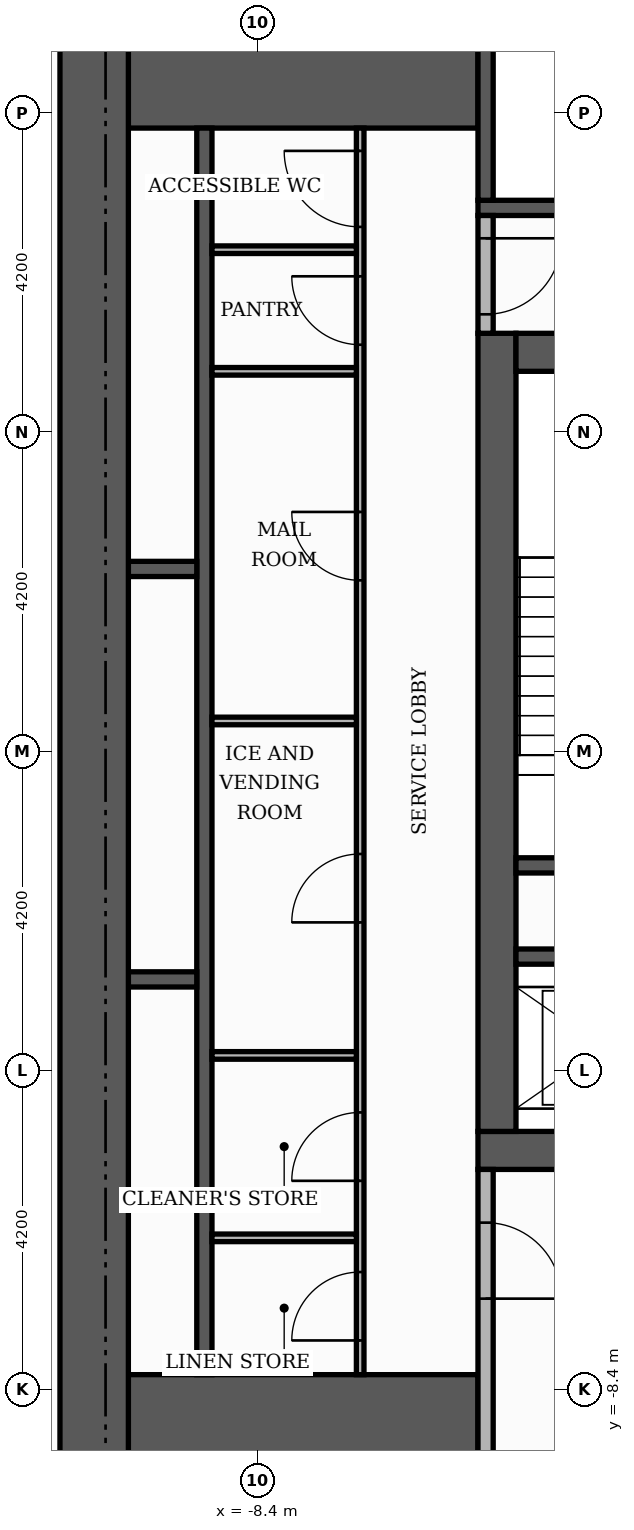
"""IFC4 building model, lengths in metres.
Left out: names, types, materials, properties, quantities, classifications, styles, units other than length and angle.
Written with IfcOpenShell. Run it as: python <this file> out.ifc"""

import sys

from ifc_helpers import new_model, si_unit, direction, frame, frame_2d, origin, place, context, subcontext, project, spatial, rectangle, extrude, element, fill, save


model = new_model("IFC4")
c1 = context("Model", 3, precision=1e-05, world=origin(), true_north=direction((0.0, 1.0)))
c2 = subcontext(c1, "Body", "Model", "MODEL_VIEW")
j1 = project(units=[si_unit("LENGTHUNIT", "METRE"), si_unit("PLANEANGLEUNIT", "RADIAN")], contexts=[c1])
p1 = place(None, origin())
s1 = spatial("IfcSite", under=j1, at=p1, CompositionType="ELEMENT")
p2 = place(p1, origin())
s2 = spatial("IfcBuilding", under=s1, at=p2, CompositionType="ELEMENT")
p3 = place(p2, frame((0.0, 0.0, 180.6)))
s3 = spatial("IfcBuildingStorey", under=s2, at=p3, CompositionType="ELEMENT", Elevation=180.6)
p4 = place(p3, frame((-5.5, -5.25, 0.0), z_axis=(0.0, 0.0, 1.0), x_axis=(1.0, 0.0, 0.0)))
e1 = element("IfcWall", 1, at=p4, inside=s3, PredefinedType="SHEAR", context=c2, shape_type="SweptSolid", body=[
    extrude(rectangle(XDim=11.0, YDim=0.5, at=frame_2d((5.5, 0.0))), origin(), (0.0, 0.0, 1.0), 7.38),
])
p5 = place(p4, frame((4.9, 0.0, 0.0)))
e2 = element("IfcOpeningElement", 2, at=p5, cuts=e1, PredefinedType="OPENING", context=c2, shape_type="SweptSolid", body=[
    extrude(rectangle(XDim=1.2, YDim=2.1, at=frame_2d((0.6, 1.05))), frame((0.0, 0.26, 0.0), z_axis=(0.0, -1.0, 0.0), x_axis=(1.0, 0.0, 0.0)), (0.0, 0.0, 1.0), 0.52),
])
p6 = place(p3, frame((-5.25, -5.0, 0.0), z_axis=(0.0, 0.0, 1.0), x_axis=(0.0, 1.0, 0.0)))
e3 = element("IfcWall", 3, at=p6, inside=s3, PredefinedType="SHEAR", context=c2, shape_type="SweptSolid", body=[
    extrude(rectangle(XDim=10.5, YDim=0.5, at=frame_2d((5.25, 0.0))), origin(), (0.0, 0.0, 1.0), 7.38),
])
p7 = place(p3, frame((-5.0, 5.25, 0.0), z_axis=(0.0, 0.0, 1.0), x_axis=(1.0, 0.0, 0.0)))
e4 = element("IfcWall", 4, at=p7, inside=s3, PredefinedType="SHEAR", context=c2, shape_type="SweptSolid", body=[
    extrude(rectangle(XDim=10.0, YDim=0.5, at=frame_2d((5.0, 0.0))), origin(), (0.0, 0.0, 1.0), 7.38),
])
p8 = place(p7, frame((4.4, 0.0, 0.0)))
e5 = element("IfcOpeningElement", 5, at=p8, cuts=e4, PredefinedType="OPENING", context=c2, shape_type="SweptSolid", body=[
    extrude(rectangle(XDim=1.2, YDim=2.1, at=frame_2d((0.6, 1.05))), frame((0.0, 0.26, 0.0), z_axis=(0.0, -1.0, 0.0), x_axis=(1.0, 0.0, 0.0)), (0.0, 0.0, 1.0), 0.52),
])
for number, where, z_axis, x_axis in (
    (6, (-10.1, -9.15, 0.0), (0.0, 0.0, 1.0), (1.0, 0.0, 0.0)),
    (7, (-10.1, 9.15, 0.0), (0.0, 0.0, 1.0), (1.0, 0.0, 0.0)),
):
    element("IfcWall", number, at=place(p3, frame(where, z_axis=z_axis, x_axis=x_axis)), inside=s3, PredefinedType="SHEAR", context=c2, shape_type="SweptSolid", body=[
        extrude(rectangle(XDim=4.6, YDim=1.9, at=frame_2d((2.3, 0.0))), origin(), (0.0, 0.0, 1.0), 7.38),
    ])
p9 = place(p3, frame((-5.0, -1.5, 0.0), z_axis=(0.0, 0.0, 1.0), x_axis=(1.0, 0.0, 0.0)))
e8 = element("IfcWall", 8, at=p9, inside=s3, PredefinedType="SHEAR", context=c2, shape_type="SweptSolid", body=[
    extrude(rectangle(XDim=3.05, YDim=0.2, at=frame_2d((1.525, 0.0))), origin(), (0.0, 0.0, 1.0), 7.38),
])
p10 = place(p3, frame((-5.5, 7.15, 0.0), z_axis=(0.0, 0.0, 1.0), x_axis=(1.0, 0.0, 0.0)))
e9 = element("IfcWall", 9, at=p10, inside=s3, PredefinedType="SHEAR", context=c2, shape_type="SweptSolid", body=[
    extrude(rectangle(XDim=6.8, YDim=0.2, at=frame_2d((3.4, 0.0))), origin(), (0.0, 0.0, 1.0), 7.38),
])
p11 = place(p3, frame((-5.4, 7.25, 0.0), z_axis=(0.0, 0.0, 1.0), x_axis=(0.0, 1.0, 0.0)))
e10 = element("IfcWall", 10, at=p11, inside=s3, PredefinedType="SHEAR", context=c2, shape_type="SweptSolid", body=[
    extrude(rectangle(XDim=2.85, YDim=0.2, at=frame_2d((1.425, 0.0))), origin(), (0.0, 0.0, 1.0), 7.38),
])
p12 = place(p3, frame((-9.1, -8.2, 0.0), z_axis=(0.0, 0.0, 1.0), x_axis=(0.0, 1.0, 0.0)))
e11 = element("IfcWall", 11, at=p12, inside=s3, PredefinedType="SHEAR", context=c2, shape_type="SweptSolid", body=[
    extrude(rectangle(XDim=16.4, YDim=0.2, at=frame_2d((8.2, 0.0))), origin(), (0.0, 0.0, 1.0), 7.38),
])
p13 = place(p3, frame((-10.1, -3.0, 0.0), z_axis=(0.0, 0.0, 1.0), x_axis=(1.0, 0.0, 0.0)))
e12 = element("IfcWall", 12, at=p13, inside=s3, PredefinedType="SHEAR", context=c2, shape_type="SweptSolid", body=[
    extrude(rectangle(XDim=0.9, YDim=0.2, at=frame_2d((0.45, 0.0))), origin(), (0.0, 0.0, 1.0), 7.38),
])
p14 = place(p3, frame((-5.0, -2.7, 0.0), z_axis=(0.0, 0.0, 1.0), x_axis=(1.0, 0.0, 0.0)))
e13 = element("IfcWall", 13, at=p14, inside=s3, PredefinedType="SHEAR", context=c2, shape_type="SweptSolid", body=[
    extrude(rectangle(XDim=2.85, YDim=0.2, at=frame_2d((1.425, 0.0))), origin(), (0.0, 0.0, 1.0), 7.38),
])
p15 = place(p3, frame((-10.1, 2.4, 0.0), z_axis=(0.0, 0.0, 1.0), x_axis=(1.0, 0.0, 0.0)))
e14 = element("IfcWall", 14, at=p15, inside=s3, PredefinedType="SHEAR", context=c2, shape_type="SweptSolid", body=[
    extrude(rectangle(XDim=0.9, YDim=0.2, at=frame_2d((0.45, 0.0))), origin(), (0.0, 0.0, 1.0), 7.38),
])
p16 = place(p3, frame((-10.55, -10.1, 0.0), z_axis=(0.0, 0.0, 1.0), x_axis=(0.0, 1.0, 0.0)))
e15 = element("IfcWall", 15, at=p16, inside=s3, PredefinedType="SHEAR", context=c2, shape_type="SweptSolid", body=[
    extrude(rectangle(XDim=20.2, YDim=0.9, at=frame_2d((10.1, 0.0))), origin(), (0.0, 0.0, 1.0), 7.38),
])
p17 = place(p3, frame((-5.4, -10.1, 0.0), z_axis=(0.0, 0.0, 1.0), x_axis=(0.0, 1.0, 0.0)))
e16 = element("IfcWall", 16, at=p17, inside=s3, PredefinedType="PARTITIONING", context=c2, shape_type="SweptSolid", body=[
    extrude(rectangle(XDim=4.6, YDim=0.2, at=frame_2d((2.3, 0.0))), origin(), (0.0, 0.0, 1.0), 7.38),
])
p18 = place(p17, frame((2.9, 0.0, 0.0)))
e17 = element("IfcOpeningElement", 17, at=p18, cuts=e16, PredefinedType="OPENING", context=c2, shape_type="SweptSolid", body=[
    extrude(rectangle(XDim=1.0, YDim=2.1, at=frame_2d((0.5, 1.05))), frame((0.0, 0.11, 0.0), z_axis=(0.0, -1.0, 0.0), x_axis=(1.0, 0.0, 0.0)), (0.0, 0.0, 1.0), 0.22),
])
p19 = place(p3, frame((-7.05, -8.2, 0.0), z_axis=(0.0, 0.0, 1.0), x_axis=(0.0, 1.0, 0.0)))
e18 = element("IfcWall", 18, at=p19, inside=s3, PredefinedType="PARTITIONING", context=c2, shape_type="SweptSolid", body=[
    extrude(rectangle(XDim=16.4, YDim=0.1, at=frame_2d((8.2, 0.0))), origin(), (0.0, 0.0, 1.0), 7.38),
])
p20 = place(p19, frame((0.45, 0.0, 0.0)))
e19 = element("IfcOpeningElement", 19, at=p20, cuts=e18, PredefinedType="OPENING", context=c2, shape_type="SweptSolid", body=[
    extrude(rectangle(XDim=0.9, YDim=2.1, at=frame_2d((0.45, 1.05))), frame((0.0, 0.06, 0.0), z_axis=(0.0, -1.0, 0.0), x_axis=(1.0, 0.0, 0.0)), (0.0, 0.0, 1.0), 0.12),
])
p21 = place(p19, frame((2.55, 0.0, 0.0)))
e20 = element("IfcOpeningElement", 20, at=p21, cuts=e18, PredefinedType="OPENING", context=c2, shape_type="SweptSolid", body=[
    extrude(rectangle(XDim=0.9, YDim=2.1, at=frame_2d((0.45, 1.05))), frame((0.0, 0.06, 0.0), z_axis=(0.0, -1.0, 0.0), x_axis=(1.0, 0.0, 0.0)), (0.0, 0.0, 1.0), 0.12),
])
p22 = place(p19, frame((5.95, 0.0, 0.0)))
e21 = element("IfcOpeningElement", 21, at=p22, cuts=e18, PredefinedType="OPENING", context=c2, shape_type="SweptSolid", body=[
    extrude(rectangle(XDim=0.9, YDim=2.1, at=frame_2d((0.45, 1.05))), frame((0.0, 0.06, 0.0), z_axis=(0.0, -1.0, 0.0), x_axis=(1.0, 0.0, 0.0)), (0.0, 0.0, 1.0), 0.12),
])
p23 = place(p19, frame((10.45, 0.0, 0.0)))
e22 = element("IfcOpeningElement", 22, at=p23, cuts=e18, PredefinedType="OPENING", context=c2, shape_type="SweptSolid", body=[
    extrude(rectangle(XDim=0.9, YDim=2.1, at=frame_2d((0.45, 1.05))), frame((0.0, 0.06, 0.0), z_axis=(0.0, -1.0, 0.0), x_axis=(1.0, 0.0, 0.0)), (0.0, 0.0, 1.0), 0.12),
])
p24 = place(p19, frame((13.55, 0.0, 0.0)))
e23 = element("IfcOpeningElement", 23, at=p24, cuts=e18, PredefinedType="OPENING", context=c2, shape_type="SweptSolid", body=[
    extrude(rectangle(XDim=0.9, YDim=2.1, at=frame_2d((0.45, 1.05))), frame((0.0, 0.06, 0.0), z_axis=(0.0, -1.0, 0.0), x_axis=(1.0, 0.0, 0.0)), (0.0, 0.0, 1.0), 0.12),
])
p25 = place(p19, frame((15.1, 0.0, 0.0)))
e24 = element("IfcOpeningElement", 24, at=p25, cuts=e18, PredefinedType="OPENING", context=c2, shape_type="SweptSolid", body=[
    extrude(rectangle(XDim=1.0, YDim=2.1, at=frame_2d((0.5, 1.05))), frame((0.0, 0.06, 0.0), z_axis=(0.0, -1.0, 0.0), x_axis=(1.0, 0.0, 0.0)), (0.0, 0.0, 1.0), 0.12),
])
for number, where, z_axis, x_axis in (
    (25, (-9.0, -6.4, 0.0), (0.0, 0.0, 1.0), (1.0, 0.0, 0.0)),
    (26, (-9.0, -4.0, 0.0), (0.0, 0.0, 1.0), (1.0, 0.0, 0.0)),
    (27, (-9.0, 0.4, 0.0), (0.0, 0.0, 1.0), (1.0, 0.0, 0.0)),
    (28, (-9.0, 5.0, 0.0), (0.0, 0.0, 1.0), (1.0, 0.0, 0.0)),
):
    element("IfcWall", number, at=place(p3, frame(where, z_axis=z_axis, x_axis=x_axis)), inside=s3, PredefinedType="PARTITIONING", context=c2, shape_type="SweptSolid", body=[
        extrude(rectangle(XDim=1.9, YDim=0.1, at=frame_2d((0.95, 0.0))), origin(), (0.0, 0.0, 1.0), 7.38),
    ])
p26 = place(p3, frame((-5.4, 5.5, 0.0), z_axis=(0.0, 0.0, 1.0), x_axis=(0.0, 1.0, 0.0)))
e29 = element("IfcWall", 29, at=p26, inside=s3, PredefinedType="PARTITIONING", context=c2, shape_type="SweptSolid", body=[
    extrude(rectangle(XDim=1.55, YDim=0.2, at=frame_2d((0.775, 0.0))), origin(), (0.0, 0.0, 1.0), 7.38),
])
p27 = place(p26, frame((0.25, 0.0, 0.0)))
e30 = element("IfcOpeningElement", 30, at=p27, cuts=e29, PredefinedType="OPENING", context=c2, shape_type="SweptSolid", body=[
    extrude(rectangle(XDim=1.0, YDim=2.1, at=frame_2d((0.5, 1.05))), frame((0.0, 0.11, 0.0), z_axis=(0.0, -1.0, 0.0), x_axis=(1.0, 0.0, 0.0)), (0.0, 0.0, 1.0), 0.22),
])
p28 = place(p3, frame((-9.0, 6.6, 0.0), z_axis=(0.0, 0.0, 1.0), x_axis=(1.0, 0.0, 0.0)))
e31 = element("IfcWall", 31, at=p28, inside=s3, PredefinedType="PARTITIONING", context=c2, shape_type="SweptSolid", body=[
    extrude(rectangle(XDim=1.9, YDim=0.1, at=frame_2d((0.95, 0.0))), origin(), (0.0, 0.0, 1.0), 7.38),
])
p29 = place(p27, frame((1.0, 0.0, 0.0), z_axis=(0.0, 0.0, 1.0), x_axis=(-1.0, 0.0, 0.0)))
e32 = element("IfcDoor", 32, at=p29, inside=s3, OperationType="SINGLE_SWING_RIGHT", PredefinedType="DOOR", context=c2, shape_type="SweptSolid", body=[
    extrude(rectangle(XDim=1.0, YDim=2.1, at=frame_2d((0.5, 1.05))), frame((0.0, 0.025, 0.0), z_axis=(0.0, -1.0, 0.0), x_axis=(1.0, 0.0, 0.0)), (0.0, 0.0, 1.0), 0.05),
])
fill(e30, e32)
p30 = place(p18, frame((1.0, 0.0, 0.0), z_axis=(0.0, 0.0, 1.0), x_axis=(-1.0, 0.0, 0.0)))
e33 = element("IfcDoor", 33, at=p30, inside=s3, OperationType="SINGLE_SWING_LEFT", PredefinedType="DOOR", context=c2, shape_type="SweptSolid", body=[
    extrude(rectangle(XDim=1.0, YDim=2.1, at=frame_2d((0.5, 1.05))), frame((0.0, 0.025, 0.0), z_axis=(0.0, -1.0, 0.0), x_axis=(1.0, 0.0, 0.0)), (0.0, 0.0, 1.0), 0.05),
])
fill(e17, e33)
p31 = place(p20, origin())
e34 = element("IfcDoor", 34, at=p31, inside=s3, OperationType="SINGLE_SWING_LEFT", PredefinedType="DOOR", context=c2, shape_type="SweptSolid", body=[
    extrude(rectangle(XDim=0.9, YDim=2.1, at=frame_2d((0.45, 1.05))), frame((0.0, 0.025, 0.0), z_axis=(0.0, -1.0, 0.0), x_axis=(1.0, 0.0, 0.0)), (0.0, 0.0, 1.0), 0.05),
])
fill(e19, e34)
p32 = place(p21, origin())
e35 = element("IfcDoor", 35, at=p32, inside=s3, OperationType="SINGLE_SWING_LEFT", PredefinedType="DOOR", context=c2, shape_type="SweptSolid", body=[
    extrude(rectangle(XDim=0.9, YDim=2.1, at=frame_2d((0.45, 1.05))), frame((0.0, 0.025, 0.0), z_axis=(0.0, -1.0, 0.0), x_axis=(1.0, 0.0, 0.0)), (0.0, 0.0, 1.0), 0.05),
])
fill(e20, e35)
p33 = place(p22, origin())
e36 = element("IfcDoor", 36, at=p33, inside=s3, OperationType="SINGLE_SWING_LEFT", PredefinedType="DOOR", context=c2, shape_type="SweptSolid", body=[
    extrude(rectangle(XDim=0.9, YDim=2.1, at=frame_2d((0.45, 1.05))), frame((0.0, 0.025, 0.0), z_axis=(0.0, -1.0, 0.0), x_axis=(1.0, 0.0, 0.0)), (0.0, 0.0, 1.0), 0.05),
])
fill(e21, e36)
p34 = place(p23, origin())
e37 = element("IfcDoor", 37, at=p34, inside=s3, OperationType="SINGLE_SWING_RIGHT", PredefinedType="DOOR", context=c2, shape_type="SweptSolid", body=[
    extrude(rectangle(XDim=0.9, YDim=2.1, at=frame_2d((0.45, 1.05))), frame((0.0, 0.025, 0.0), z_axis=(0.0, -1.0, 0.0), x_axis=(1.0, 0.0, 0.0)), (0.0, 0.0, 1.0), 0.05),
])
fill(e22, e37)
p35 = place(p24, origin())
e38 = element("IfcDoor", 38, at=p35, inside=s3, OperationType="SINGLE_SWING_RIGHT", PredefinedType="DOOR", context=c2, shape_type="SweptSolid", body=[
    extrude(rectangle(XDim=0.9, YDim=2.1, at=frame_2d((0.45, 1.05))), frame((0.0, 0.025, 0.0), z_axis=(0.0, -1.0, 0.0), x_axis=(1.0, 0.0, 0.0)), (0.0, 0.0, 1.0), 0.05),
])
fill(e23, e38)
p36 = place(p25, origin())
e39 = element("IfcDoor", 39, at=p36, inside=s3, OperationType="SINGLE_SWING_RIGHT", PredefinedType="DOOR", context=c2, shape_type="SweptSolid", body=[
    extrude(rectangle(XDim=1.0, YDim=2.1, at=frame_2d((0.5, 1.05))), frame((0.0, 0.025, 0.0), z_axis=(0.0, -1.0, 0.0), x_axis=(1.0, 0.0, 0.0)), (0.0, 0.0, 1.0), 0.05),
])
fill(e24, e39)
save(model, sys.argv[1])
